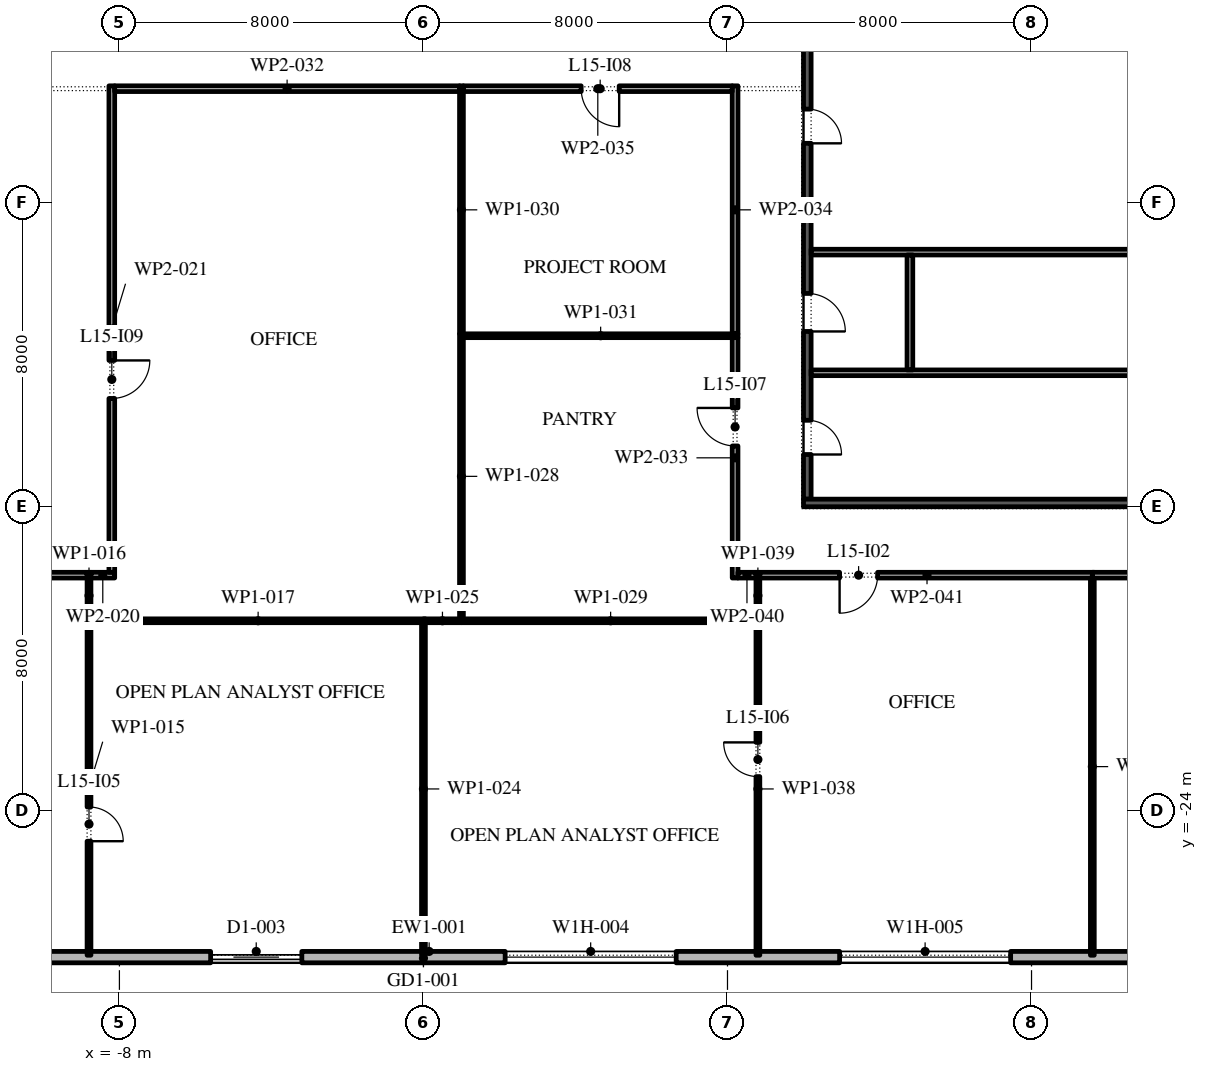
"""IFC4 building model, lengths in metres.
Left out: names, types, materials, properties, quantities, classifications, styles, units other than length and angle.
Written with IfcOpenShell. Run it as: python <this file> out.ifc"""

import sys

from ifc_helpers import new_model, si_unit, direction, frame, frame_2d, origin, place, context, subcontext, project, spatial, rectangle, extrude, element, fill, save


model = new_model("IFC4")
c1 = context("Model", 3, precision=1e-05, world=origin(), true_north=direction((0.0, 1.0)))
c2 = subcontext(c1, "Body", "Model", "MODEL_VIEW")
j1 = project(units=[si_unit("LENGTHUNIT", "METRE"), si_unit("PLANEANGLEUNIT", "RADIAN")], contexts=[c1])
p1 = place(None, origin())
s1 = spatial("IfcSite", under=j1, at=p1, CompositionType="ELEMENT")
p2 = place(p1, origin())
s2 = spatial("IfcBuilding", under=s1, at=p2, CompositionType="ELEMENT")
p3 = place(p2, frame((0.0, 0.0, 73.2)))
s3 = spatial("IfcBuildingStorey", under=s2, at=p3, CompositionType="ELEMENT", Elevation=73.2)
p4 = place(p3, frame((-26.1, -27.85, 0.0), z_axis=(0.0, 0.0, 1.0), x_axis=(1.0, 0.0, 0.0)))
e1 = element("IfcWall", 1, at=p4, inside=s3, PredefinedType="STANDARD", context=c2, shape_type="SweptSolid", body=[
    extrude(rectangle(XDim=52.5, YDim=0.3, at=frame_2d((26.25, 0.0))), origin(), (0.0, 0.0, 1.0), 4.0),
])
p5 = place(p4, frame((2.0, 0.0, 0.45)))
e2 = element("IfcOpeningElement", 2, at=p5, cuts=e1, PredefinedType="OPENING", context=c2, shape_type="SweptSolid", body=[
    extrude(rectangle(XDim=4.5, YDim=2.75, at=frame_2d((2.25, 1.375))), frame((0.0, 0.16, 0.0), z_axis=(0.0, -1.0, 0.0), x_axis=(1.0, 0.0, 0.0)), (0.0, 0.0, 1.0), 0.32),
])
p6 = place(p4, frame((10.65, 0.0, 0.45)))
e3 = element("IfcOpeningElement", 3, at=p6, cuts=e1, PredefinedType="OPENING", context=c2, shape_type="SweptSolid", body=[
    extrude(rectangle(XDim=4.5, YDim=2.75, at=frame_2d((2.25, 1.375))), frame((0.0, 0.16, 0.0), z_axis=(0.0, -1.0, 0.0), x_axis=(1.0, 0.0, 0.0)), (0.0, 0.0, 1.0), 0.32),
])
p7 = place(p4, frame((20.5, 0.0, 0.0)))
e4 = element("IfcOpeningElement", 4, at=p7, cuts=e1, PredefinedType="OPENING", context=c2, shape_type="SweptSolid", body=[
    extrude(rectangle(XDim=2.4, YDim=3.5, at=frame_2d((1.2, 1.75))), frame((0.0, 0.16, 0.0), z_axis=(0.0, -1.0, 0.0), x_axis=(1.0, 0.0, 0.0)), (0.0, 0.0, 1.0), 0.32),
])
p8 = place(p4, frame((28.25, 0.0, 0.45)))
e5 = element("IfcOpeningElement", 5, at=p8, cuts=e1, PredefinedType="OPENING", context=c2, shape_type="SweptSolid", body=[
    extrude(rectangle(XDim=4.5, YDim=2.75, at=frame_2d((2.25, 1.375))), frame((0.0, 0.16, 0.0), z_axis=(0.0, -1.0, 0.0), x_axis=(1.0, 0.0, 0.0)), (0.0, 0.0, 1.0), 0.32),
])
p9 = place(p4, frame((37.05, 0.0, 0.45)))
e6 = element("IfcOpeningElement", 6, at=p9, cuts=e1, PredefinedType="OPENING", context=c2, shape_type="SweptSolid", body=[
    extrude(rectangle(XDim=4.5, YDim=2.75, at=frame_2d((2.25, 1.375))), frame((0.0, 0.16, 0.0), z_axis=(0.0, -1.0, 0.0), x_axis=(1.0, 0.0, 0.0)), (0.0, 0.0, 1.0), 0.32),
])
p10 = place(p4, frame((45.85, 0.0, 0.45)))
e7 = element("IfcOpeningElement", 7, at=p10, cuts=e1, PredefinedType="OPENING", context=c2, shape_type="SweptSolid", body=[
    extrude(rectangle(XDim=4.5, YDim=2.75, at=frame_2d((2.25, 1.375))), frame((0.0, 0.16, 0.0), z_axis=(0.0, -1.0, 0.0), x_axis=(1.0, 0.0, 0.0)), (0.0, 0.0, 1.0), 0.32),
])
p11 = place(p3, frame((10.1, -15.8, 0.0), z_axis=(0.0, 0.0, 1.0), x_axis=(0.0, 1.0, 0.0)))
e8 = element("IfcWall", 8, at=p11, inside=s3, PredefinedType="SHEAR", context=c2, shape_type="SweptSolid", body=[
    extrude(rectangle(XDim=13.05, YDim=0.2, at=frame_2d((6.525, 0.0))), origin(), (0.0, 0.0, 1.0), 4.0),
])
p12 = place(p11, frame((1.175, 0.0, 0.0)))
e9 = element("IfcOpeningElement", 9, at=p12, cuts=e8, PredefinedType="OPENING", context=c2, shape_type="SweptSolid", body=[
    extrude(rectangle(XDim=0.9, YDim=2.1, at=frame_2d((0.45, 1.05))), frame((0.0, 0.11, 0.0), z_axis=(0.0, -1.0, 0.0), x_axis=(1.0, 0.0, 0.0)), (0.0, 0.0, 1.0), 0.22),
])
p13 = place(p11, frame((4.413, 0.0, 0.0)))
e10 = element("IfcOpeningElement", 10, at=p13, cuts=e8, PredefinedType="OPENING", context=c2, shape_type="SweptSolid", body=[
    extrude(rectangle(XDim=1.0, YDim=2.1, at=frame_2d((0.5, 1.05))), frame((0.0, 0.11, 0.0), z_axis=(0.0, -1.0, 0.0), x_axis=(1.0, 0.0, 0.0)), (0.0, 0.0, 1.0), 0.22),
])
p14 = place(p11, frame((9.363, 0.0, 0.0)))
e11 = element("IfcOpeningElement", 11, at=p14, cuts=e8, PredefinedType="OPENING", context=c2, shape_type="SweptSolid", body=[
    extrude(rectangle(XDim=0.9, YDim=2.1, at=frame_2d((0.45, 1.05))), frame((0.0, 0.11, 0.0), z_axis=(0.0, -1.0, 0.0), x_axis=(1.0, 0.0, 0.0)), (0.0, 0.0, 1.0), 0.22),
])
p15 = place(p3, frame((10.0, -15.9, 0.0), z_axis=(0.0, 0.0, 1.0), x_axis=(1.0, 0.0, 0.0)))
e12 = element("IfcWall", 12, at=p15, inside=s3, PredefinedType="SHEAR", context=c2, shape_type="SweptSolid", body=[
    extrude(rectangle(XDim=12.0, YDim=0.2, at=frame_2d((6.0, 0.0))), origin(), (0.0, 0.0, 1.0), 4.0),
])
for number, where, z_axis, x_axis in (
    (13, (10.2, -9.3, 0.0), (0.0, 0.0, 1.0), (1.0, 0.0, 0.0)),
    (14, (10.2, -12.475, 0.0), (0.0, 0.0, 1.0), (1.0, 0.0, 0.0)),
):
    element("IfcWall", number, at=place(p3, frame(where, z_axis=z_axis, x_axis=x_axis)), inside=s3, PredefinedType="PARTITIONING", context=c2, shape_type="SweptSolid", body=[
        extrude(rectangle(XDim=11.6, YDim=0.15, at=frame_2d((5.8, 0.0))), origin(), (0.0, 0.0, 1.0), 4.0),
    ])
p16 = place(p3, frame((12.8, -12.4, 0.0), z_axis=(0.0, 0.0, 1.0), x_axis=(0.0, 1.0, 0.0)))
e15 = element("IfcWall", 15, at=p16, inside=s3, PredefinedType="PARTITIONING", context=c2, shape_type="SweptSolid", body=[
    extrude(rectangle(XDim=3.025, YDim=0.15, at=frame_2d((1.512, 0.0))), origin(), (0.0, 0.0, 1.0), 4.0),
])
p17 = place(p3, frame((-8.8, -27.8, 0.0), z_axis=(0.0, 0.0, 1.0), x_axis=(0.0, 1.0, 0.0)))
e16 = element("IfcWall", 16, at=p17, inside=s3, PredefinedType="PARTITIONING", context=c2, shape_type="SweptSolid", body=[
    extrude(rectangle(XDim=8.85, YDim=0.1, at=frame_2d((4.425, 0.0))), origin(), (0.0, 0.0, 1.0), 4.0),
])
p18 = place(p17, frame((3.0, 0.0, 0.0)))
e17 = element("IfcOpeningElement", 17, at=p18, cuts=e16, PredefinedType="OPENING", context=c2, shape_type="SweptSolid", body=[
    extrude(rectangle(XDim=0.9, YDim=2.1, at=frame_2d((0.45, 1.05))), frame((0.0, 0.06, 0.0), z_axis=(0.0, -1.0, 0.0), x_axis=(1.0, 0.0, 0.0)), (0.0, 0.0, 1.0), 0.12),
])
p19 = place(p3, frame((-8.8, -18.95, 0.0), z_axis=(0.0, 0.0, 1.0), x_axis=(0.0, 1.0, 0.0)))
e18 = element("IfcWall", 18, at=p19, inside=s3, PredefinedType="PARTITIONING", context=c2, shape_type="SweptSolid", body=[
    extrude(rectangle(XDim=1.225, YDim=0.1, at=frame_2d((0.612, 0.0))), origin(), (0.0, 0.0, 1.0), 4.0),
])
p20 = place(p3, frame((-8.75, -19.0, 0.0), z_axis=(0.0, 0.0, 1.0), x_axis=(1.0, 0.0, 0.0)))
e19 = element("IfcWall", 19, at=p20, inside=s3, PredefinedType="PARTITIONING", context=c2, shape_type="SweptSolid", body=[
    extrude(rectangle(XDim=8.8, YDim=0.1, at=frame_2d((4.4, 0.0))), origin(), (0.0, 0.0, 1.0), 4.0),
])
p21 = place(p3, frame((-8.85, -17.8, 0.0), z_axis=(0.0, 0.0, 1.0), x_axis=(-1.0, 0.0, 0.0)))
e20 = element("IfcWall", 20, at=p21, inside=s3, PredefinedType="PARTITIONING", context=c2, shape_type="SweptSolid", body=[
    extrude(rectangle(XDim=8.7, YDim=0.15, at=frame_2d((4.35, 0.0))), origin(), (0.0, 0.0, 1.0), 4.0),
])
p22 = place(p21, frame((4.85, 0.0, 0.0)))
e21 = element("IfcOpeningElement", 21, at=p22, cuts=e20, PredefinedType="OPENING", context=c2, shape_type="SweptSolid", body=[
    extrude(rectangle(XDim=1.0, YDim=2.1, at=frame_2d((0.5, 1.05))), frame((0.0, 0.085, 0.0), z_axis=(0.0, -1.0, 0.0), x_axis=(1.0, 0.0, 0.0)), (0.0, 0.0, 1.0), 0.17),
])
p23 = place(p3, frame((-8.125, -17.8, 0.0), z_axis=(0.0, 0.0, 1.0), x_axis=(-1.0, 0.0, 0.0)))
e22 = element("IfcWall", 22, at=p23, inside=s3, PredefinedType="PARTITIONING", context=c2, shape_type="SweptSolid", body=[
    extrude(rectangle(XDim=0.625, YDim=0.15, at=frame_2d((0.312, 0.0))), origin(), (0.0, 0.0, 1.0), 4.0),
])
p24 = place(p3, frame((-8.2, -4.925, 0.0), z_axis=(0.0, 0.0, 1.0), x_axis=(0.0, -1.0, 0.0)))
e23 = element("IfcWall", 23, at=p24, inside=s3, PredefinedType="PARTITIONING", context=c2, shape_type="SweptSolid", body=[
    extrude(rectangle(XDim=12.8, YDim=0.15, at=frame_2d((6.4, 0.0))), origin(), (0.0, 0.0, 1.0), 4.0),
])
p25 = place(p24, frame((7.225, 0.0, 0.0)))
e24 = element("IfcOpeningElement", 24, at=p25, cuts=e23, PredefinedType="OPENING", context=c2, shape_type="SweptSolid", body=[
    extrude(rectangle(XDim=1.0, YDim=2.1, at=frame_2d((0.5, 1.05))), frame((0.0, 0.085, 0.0), z_axis=(0.0, -1.0, 0.0), x_axis=(1.0, 0.0, 0.0)), (0.0, 0.0, 1.0), 0.17),
])
p26 = place(p3, frame((0.0, -19.05, 0.0), z_axis=(0.0, 0.0, 1.0), x_axis=(0.0, -1.0, 0.0)))
e25 = element("IfcWall", 25, at=p26, inside=s3, PredefinedType="PARTITIONING", context=c2, shape_type="SweptSolid", body=[
    extrude(rectangle(XDim=8.75, YDim=0.1, at=frame_2d((4.375, 0.0))), origin(), (0.0, 0.0, 1.0), 4.0),
])
p27 = place(p3, frame((0.0, -19.0, 0.0), z_axis=(0.0, 0.0, 1.0), x_axis=(1.0, 0.0, 0.0)))
e26 = element("IfcWall", 26, at=p27, inside=s3, PredefinedType="PARTITIONING", context=c2, shape_type="SweptSolid", body=[
    extrude(rectangle(XDim=1.0, YDim=0.1, at=frame_2d((0.5, 0.0))), origin(), (0.0, 0.0, 1.0), 4.0),
])
p28 = place(p3, frame((1.0, -18.95, 0.0), z_axis=(0.0, 0.0, 1.0), x_axis=(0.0, 1.0, 0.0)))
e27 = element("IfcWall", 27, at=p28, inside=s3, PredefinedType="PARTITIONING", context=c2, shape_type="SweptSolid", body=[
    extrude(rectangle(XDim=7.5, YDim=0.1, at=frame_2d((3.75, 0.0))), origin(), (0.0, 0.0, 1.0), 4.0),
])
p29 = place(p3, frame((1.0, -19.0, 0.0), z_axis=(0.0, 0.0, 1.0), x_axis=(1.0, 0.0, 0.0)))
e28 = element("IfcWall", 28, at=p29, inside=s3, PredefinedType="PARTITIONING", context=c2, shape_type="SweptSolid", body=[
    extrude(rectangle(XDim=7.85, YDim=0.1, at=frame_2d((3.925, 0.0))), origin(), (0.0, 0.0, 1.0), 4.0),
])
p30 = place(p3, frame((1.0, -11.45, 0.0), z_axis=(0.0, 0.0, 1.0), x_axis=(0.0, 1.0, 0.0)))
e29 = element("IfcWall", 29, at=p30, inside=s3, PredefinedType="PARTITIONING", context=c2, shape_type="SweptSolid", body=[
    extrude(rectangle(XDim=6.525, YDim=0.1, at=frame_2d((3.262, 0.0))), origin(), (0.0, 0.0, 1.0), 4.0),
])
p31 = place(p3, frame((1.05, -11.5, 0.0), z_axis=(0.0, 0.0, 1.0), x_axis=(1.0, 0.0, 0.0)))
e30 = element("IfcWall", 30, at=p31, inside=s3, PredefinedType="PARTITIONING", context=c2, shape_type="SweptSolid", body=[
    extrude(rectangle(XDim=7.225, YDim=0.1, at=frame_2d((3.612, 0.0))), origin(), (0.0, 0.0, 1.0), 4.0),
])
p32 = place(p3, frame((0.95, -5.0, 0.0), z_axis=(0.0, 0.0, 1.0), x_axis=(-1.0, 0.0, 0.0)))
e31 = element("IfcWall", 31, at=p32, inside=s3, PredefinedType="PARTITIONING", context=c2, shape_type="SweptSolid", body=[
    extrude(rectangle(XDim=9.075, YDim=0.15, at=frame_2d((4.538, 0.0))), origin(), (0.0, 0.0, 1.0), 4.0),
])
p33 = place(p3, frame((8.2, -17.875, 0.0), z_axis=(0.0, 0.0, 1.0), x_axis=(0.0, 1.0, 0.0)))
e32 = element("IfcWall", 32, at=p33, inside=s3, PredefinedType="PARTITIONING", context=c2, shape_type="SweptSolid", body=[
    extrude(rectangle(XDim=6.325, YDim=0.15, at=frame_2d((3.163, 0.0))), origin(), (0.0, 0.0, 1.0), 4.0),
])
p34 = place(p33, frame((3.475, 0.0, 0.0)))
e33 = element("IfcOpeningElement", 33, at=p34, cuts=e32, PredefinedType="OPENING", context=c2, shape_type="SweptSolid", body=[
    extrude(rectangle(XDim=1.0, YDim=2.1, at=frame_2d((0.5, 1.05))), frame((0.0, 0.085, 0.0), z_axis=(0.0, -1.0, 0.0), x_axis=(1.0, 0.0, 0.0)), (0.0, 0.0, 1.0), 0.17),
])
p35 = place(p3, frame((8.2, -11.45, 0.0), z_axis=(0.0, 0.0, 1.0), x_axis=(0.0, 1.0, 0.0)))
e34 = element("IfcWall", 34, at=p35, inside=s3, PredefinedType="PARTITIONING", context=c2, shape_type="SweptSolid", body=[
    extrude(rectangle(XDim=6.525, YDim=0.15, at=frame_2d((3.262, 0.0))), origin(), (0.0, 0.0, 1.0), 4.0),
])
p36 = place(p3, frame((8.125, -5.0, 0.0), z_axis=(0.0, 0.0, 1.0), x_axis=(-1.0, 0.0, 0.0)))
e35 = element("IfcWall", 35, at=p36, inside=s3, PredefinedType="PARTITIONING", context=c2, shape_type="SweptSolid", body=[
    extrude(rectangle(XDim=7.075, YDim=0.15, at=frame_2d((3.538, 0.0))), origin(), (0.0, 0.0, 1.0), 4.0),
])
p37 = place(p36, frame((2.975, 0.0, 0.0)))
e36 = element("IfcOpeningElement", 36, at=p37, cuts=e35, PredefinedType="OPENING", context=c2, shape_type="SweptSolid", body=[
    extrude(rectangle(XDim=1.0, YDim=2.1, at=frame_2d((0.5, 1.05))), frame((0.0, 0.085, 0.0), z_axis=(0.0, -1.0, 0.0), x_axis=(1.0, 0.0, 0.0)), (0.0, 0.0, 1.0), 0.17),
])
p38 = place(p3, frame((8.8, -27.8, 0.0), z_axis=(0.0, 0.0, 1.0), x_axis=(0.0, 1.0, 0.0)))
e37 = element("IfcWall", 37, at=p38, inside=s3, PredefinedType="PARTITIONING", context=c2, shape_type="SweptSolid", body=[
    extrude(rectangle(XDim=8.75, YDim=0.1, at=frame_2d((4.375, 0.0))), origin(), (0.0, 0.0, 1.0), 4.0),
])
p39 = place(p38, frame((4.7, 0.0, 0.0)))
e38 = element("IfcOpeningElement", 38, at=p39, cuts=e37, PredefinedType="OPENING", context=c2, shape_type="SweptSolid", body=[
    extrude(rectangle(XDim=0.9, YDim=2.1, at=frame_2d((0.45, 1.05))), frame((0.0, 0.06, 0.0), z_axis=(0.0, -1.0, 0.0), x_axis=(1.0, 0.0, 0.0)), (0.0, 0.0, 1.0), 0.12),
])
p40 = place(p3, frame((8.8, -18.95, 0.0), z_axis=(0.0, 0.0, 1.0), x_axis=(0.0, 1.0, 0.0)))
e39 = element("IfcWall", 39, at=p40, inside=s3, PredefinedType="PARTITIONING", context=c2, shape_type="SweptSolid", body=[
    extrude(rectangle(XDim=1.225, YDim=0.1, at=frame_2d((0.612, 0.0))), origin(), (0.0, 0.0, 1.0), 4.0),
])
p41 = place(p3, frame((8.75, -17.8, 0.0), z_axis=(0.0, 0.0, 1.0), x_axis=(-1.0, 0.0, 0.0)))
e40 = element("IfcWall", 40, at=p41, inside=s3, PredefinedType="PARTITIONING", context=c2, shape_type="SweptSolid", body=[
    extrude(rectangle(XDim=0.475, YDim=0.15, at=frame_2d((0.238, 0.0))), origin(), (0.0, 0.0, 1.0), 4.0),
])
p42 = place(p3, frame((17.65, -17.8, 0.0), z_axis=(0.0, 0.0, 1.0), x_axis=(-1.0, 0.0, 0.0)))
e41 = element("IfcWall", 41, at=p42, inside=s3, PredefinedType="PARTITIONING", context=c2, shape_type="SweptSolid", body=[
    extrude(rectangle(XDim=8.8, YDim=0.15, at=frame_2d((4.4, 0.0))), origin(), (0.0, 0.0, 1.0), 4.0),
])
p43 = place(p42, frame((5.7, 0.0, 0.0)))
e42 = element("IfcOpeningElement", 42, at=p43, cuts=e41, PredefinedType="OPENING", context=c2, shape_type="SweptSolid", body=[
    extrude(rectangle(XDim=1.0, YDim=2.1, at=frame_2d((0.5, 1.05))), frame((0.0, 0.085, 0.0), z_axis=(0.0, -1.0, 0.0), x_axis=(1.0, 0.0, 0.0)), (0.0, 0.0, 1.0), 0.17),
])
p44 = place(p3, frame((17.6, -17.875, 0.0), z_axis=(0.0, 0.0, 1.0), x_axis=(0.0, -1.0, 0.0)))
e43 = element("IfcWall", 43, at=p44, inside=s3, PredefinedType="PARTITIONING", context=c2, shape_type="SweptSolid", body=[
    extrude(rectangle(XDim=9.925, YDim=0.1, at=frame_2d((4.962, 0.0))), origin(), (0.0, 0.0, 1.0), 4.0),
])
p45 = place(p3, frame((23.875, -17.8, 0.0), z_axis=(0.0, 0.0, 1.0), x_axis=(-1.0, 0.0, 0.0)))
e44 = element("IfcWall", 44, at=p45, inside=s3, PredefinedType="PARTITIONING", context=c2, shape_type="SweptSolid", body=[
    extrude(rectangle(XDim=6.275, YDim=0.15, at=frame_2d((3.137, 0.0))), origin(), (0.0, 0.0, 1.0), 4.0),
])
p46 = place(p7, origin())
e45 = element("IfcDoor", 45, at=p46, inside=s3, OperationType="DOUBLE_DOOR_SLIDING", PredefinedType="DOOR", context=c2, shape_type="SweptSolid", body=[
    extrude(rectangle(XDim=2.4, YDim=3.5, at=frame_2d((1.2, 1.75))), frame((0.0, 0.025, 0.0), z_axis=(0.0, -1.0, 0.0), x_axis=(1.0, 0.0, 0.0)), (0.0, 0.0, 1.0), 0.05),
])
fill(e4, e45)
p47 = place(p8, origin())
e46 = element("IfcWindow", 46, at=p47, inside=s3, PartitioningType="DOUBLE_PANEL_VERTICAL", PredefinedType="WINDOW", context=c2, shape_type="SweptSolid", body=[
    extrude(rectangle(XDim=4.5, YDim=2.75, at=frame_2d((2.25, 1.375))), frame((0.0, 0.03, 0.0), z_axis=(0.0, -1.0, 0.0), x_axis=(1.0, 0.0, 0.0)), (0.0, 0.0, 1.0), 0.06),
])
fill(e5, e46)
p48 = place(p9, origin())
e47 = element("IfcWindow", 47, at=p48, inside=s3, PartitioningType="DOUBLE_PANEL_VERTICAL", PredefinedType="WINDOW", context=c2, shape_type="SweptSolid", body=[
    extrude(rectangle(XDim=4.5, YDim=2.75, at=frame_2d((2.25, 1.375))), frame((0.0, 0.03, 0.0), z_axis=(0.0, -1.0, 0.0), x_axis=(1.0, 0.0, 0.0)), (0.0, 0.0, 1.0), 0.06),
])
fill(e6, e47)
p49 = place(p12, frame((0.9, -0.15, 0.0), z_axis=(0.0, 0.0, 1.0), x_axis=(-1.0, 0.0, 0.0)))
e48 = element("IfcDoor", 48, at=p49, inside=s3, OperationType="SINGLE_SWING_LEFT", PredefinedType="DOOR", context=c2, shape_type="SweptSolid", body=[
    extrude(rectangle(XDim=0.9, YDim=2.1, at=frame_2d((0.45, 1.05))), frame((0.0, -0.05, 0.0), z_axis=(0.0, -1.0, 0.0), x_axis=(1.0, 0.0, 0.0)), (0.0, 0.0, 1.0), 0.05),
])
fill(e9, e48)
p50 = place(p13, frame((1.0, -0.15, 0.0), z_axis=(0.0, 0.0, 1.0), x_axis=(-1.0, 0.0, 0.0)))
e49 = element("IfcDoor", 49, at=p50, inside=s3, OperationType="SINGLE_SWING_LEFT", PredefinedType="DOOR", context=c2, shape_type="SweptSolid", body=[
    extrude(rectangle(XDim=1.0, YDim=2.1, at=frame_2d((0.5, 1.05))), frame((0.0, -0.05, 0.0), z_axis=(0.0, -1.0, 0.0), x_axis=(1.0, 0.0, 0.0)), (0.0, 0.0, 1.0), 0.05),
])
fill(e10, e49)
p51 = place(p14, frame((0.9, -0.15, 0.0), z_axis=(0.0, 0.0, 1.0), x_axis=(-1.0, 0.0, 0.0)))
e50 = element("IfcDoor", 50, at=p51, inside=s3, OperationType="SINGLE_SWING_LEFT", PredefinedType="DOOR", context=c2, shape_type="SweptSolid", body=[
    extrude(rectangle(XDim=0.9, YDim=2.1, at=frame_2d((0.45, 1.05))), frame((0.0, -0.05, 0.0), z_axis=(0.0, -1.0, 0.0), x_axis=(1.0, 0.0, 0.0)), (0.0, 0.0, 1.0), 0.05),
])
fill(e11, e50)
p52 = place(p43, origin())
e51 = element("IfcDoor", 51, at=p52, inside=s3, OperationType="SINGLE_SWING_LEFT", PredefinedType="DOOR", context=c2, shape_type="SweptSolid", body=[
    extrude(rectangle(XDim=1.0, YDim=2.1, at=frame_2d((0.5, 1.05))), frame((0.0, 0.025, 0.0), z_axis=(0.0, -1.0, 0.0), x_axis=(1.0, 0.0, 0.0)), (0.0, 0.0, 1.0), 0.05),
])
fill(e42, e51)
p53 = place(p18, frame((0.9, 0.0, 0.0), z_axis=(0.0, 0.0, 1.0), x_axis=(-1.0, 0.0, 0.0)))
e52 = element("IfcDoor", 52, at=p53, inside=s3, OperationType="SINGLE_SWING_LEFT", PredefinedType="DOOR", context=c2, shape_type="SweptSolid", body=[
    extrude(rectangle(XDim=0.9, YDim=2.1, at=frame_2d((0.45, 1.05))), frame((0.0, 0.025, 0.0), z_axis=(0.0, -1.0, 0.0), x_axis=(1.0, 0.0, 0.0)), (0.0, 0.0, 1.0), 0.05),
])
fill(e17, e52)
p54 = place(p39, origin())
e53 = element("IfcDoor", 53, at=p54, inside=s3, OperationType="SINGLE_SWING_LEFT", PredefinedType="DOOR", context=c2, shape_type="SweptSolid", body=[
    extrude(rectangle(XDim=0.9, YDim=2.1, at=frame_2d((0.45, 1.05))), frame((0.0, 0.025, 0.0), z_axis=(0.0, -1.0, 0.0), x_axis=(1.0, 0.0, 0.0)), (0.0, 0.0, 1.0), 0.05),
])
fill(e38, e53)
p55 = place(p34, origin())
e54 = element("IfcDoor", 54, at=p55, inside=s3, OperationType="SINGLE_SWING_LEFT", PredefinedType="DOOR", context=c2, shape_type="SweptSolid", body=[
    extrude(rectangle(XDim=1.0, YDim=2.1, at=frame_2d((0.5, 1.05))), frame((0.0, 0.025, 0.0), z_axis=(0.0, -1.0, 0.0), x_axis=(1.0, 0.0, 0.0)), (0.0, 0.0, 1.0), 0.05),
])
fill(e33, e54)
p56 = place(p37, origin())
e55 = element("IfcDoor", 55, at=p56, inside=s3, OperationType="SINGLE_SWING_RIGHT", PredefinedType="DOOR", context=c2, shape_type="SweptSolid", body=[
    extrude(rectangle(XDim=1.0, YDim=2.1, at=frame_2d((0.5, 1.05))), frame((0.0, 0.025, 0.0), z_axis=(0.0, -1.0, 0.0), x_axis=(1.0, 0.0, 0.0)), (0.0, 0.0, 1.0), 0.05),
])
fill(e36, e55)
p57 = place(p25, origin())
e56 = element("IfcDoor", 56, at=p57, inside=s3, OperationType="SINGLE_SWING_RIGHT", PredefinedType="DOOR", context=c2, shape_type="SweptSolid", body=[
    extrude(rectangle(XDim=1.0, YDim=2.1, at=frame_2d((0.5, 1.05))), frame((0.0, 0.025, 0.0), z_axis=(0.0, -1.0, 0.0), x_axis=(1.0, 0.0, 0.0)), (0.0, 0.0, 1.0), 0.05),
])
fill(e24, e56)
save(model, sys.argv[1])
